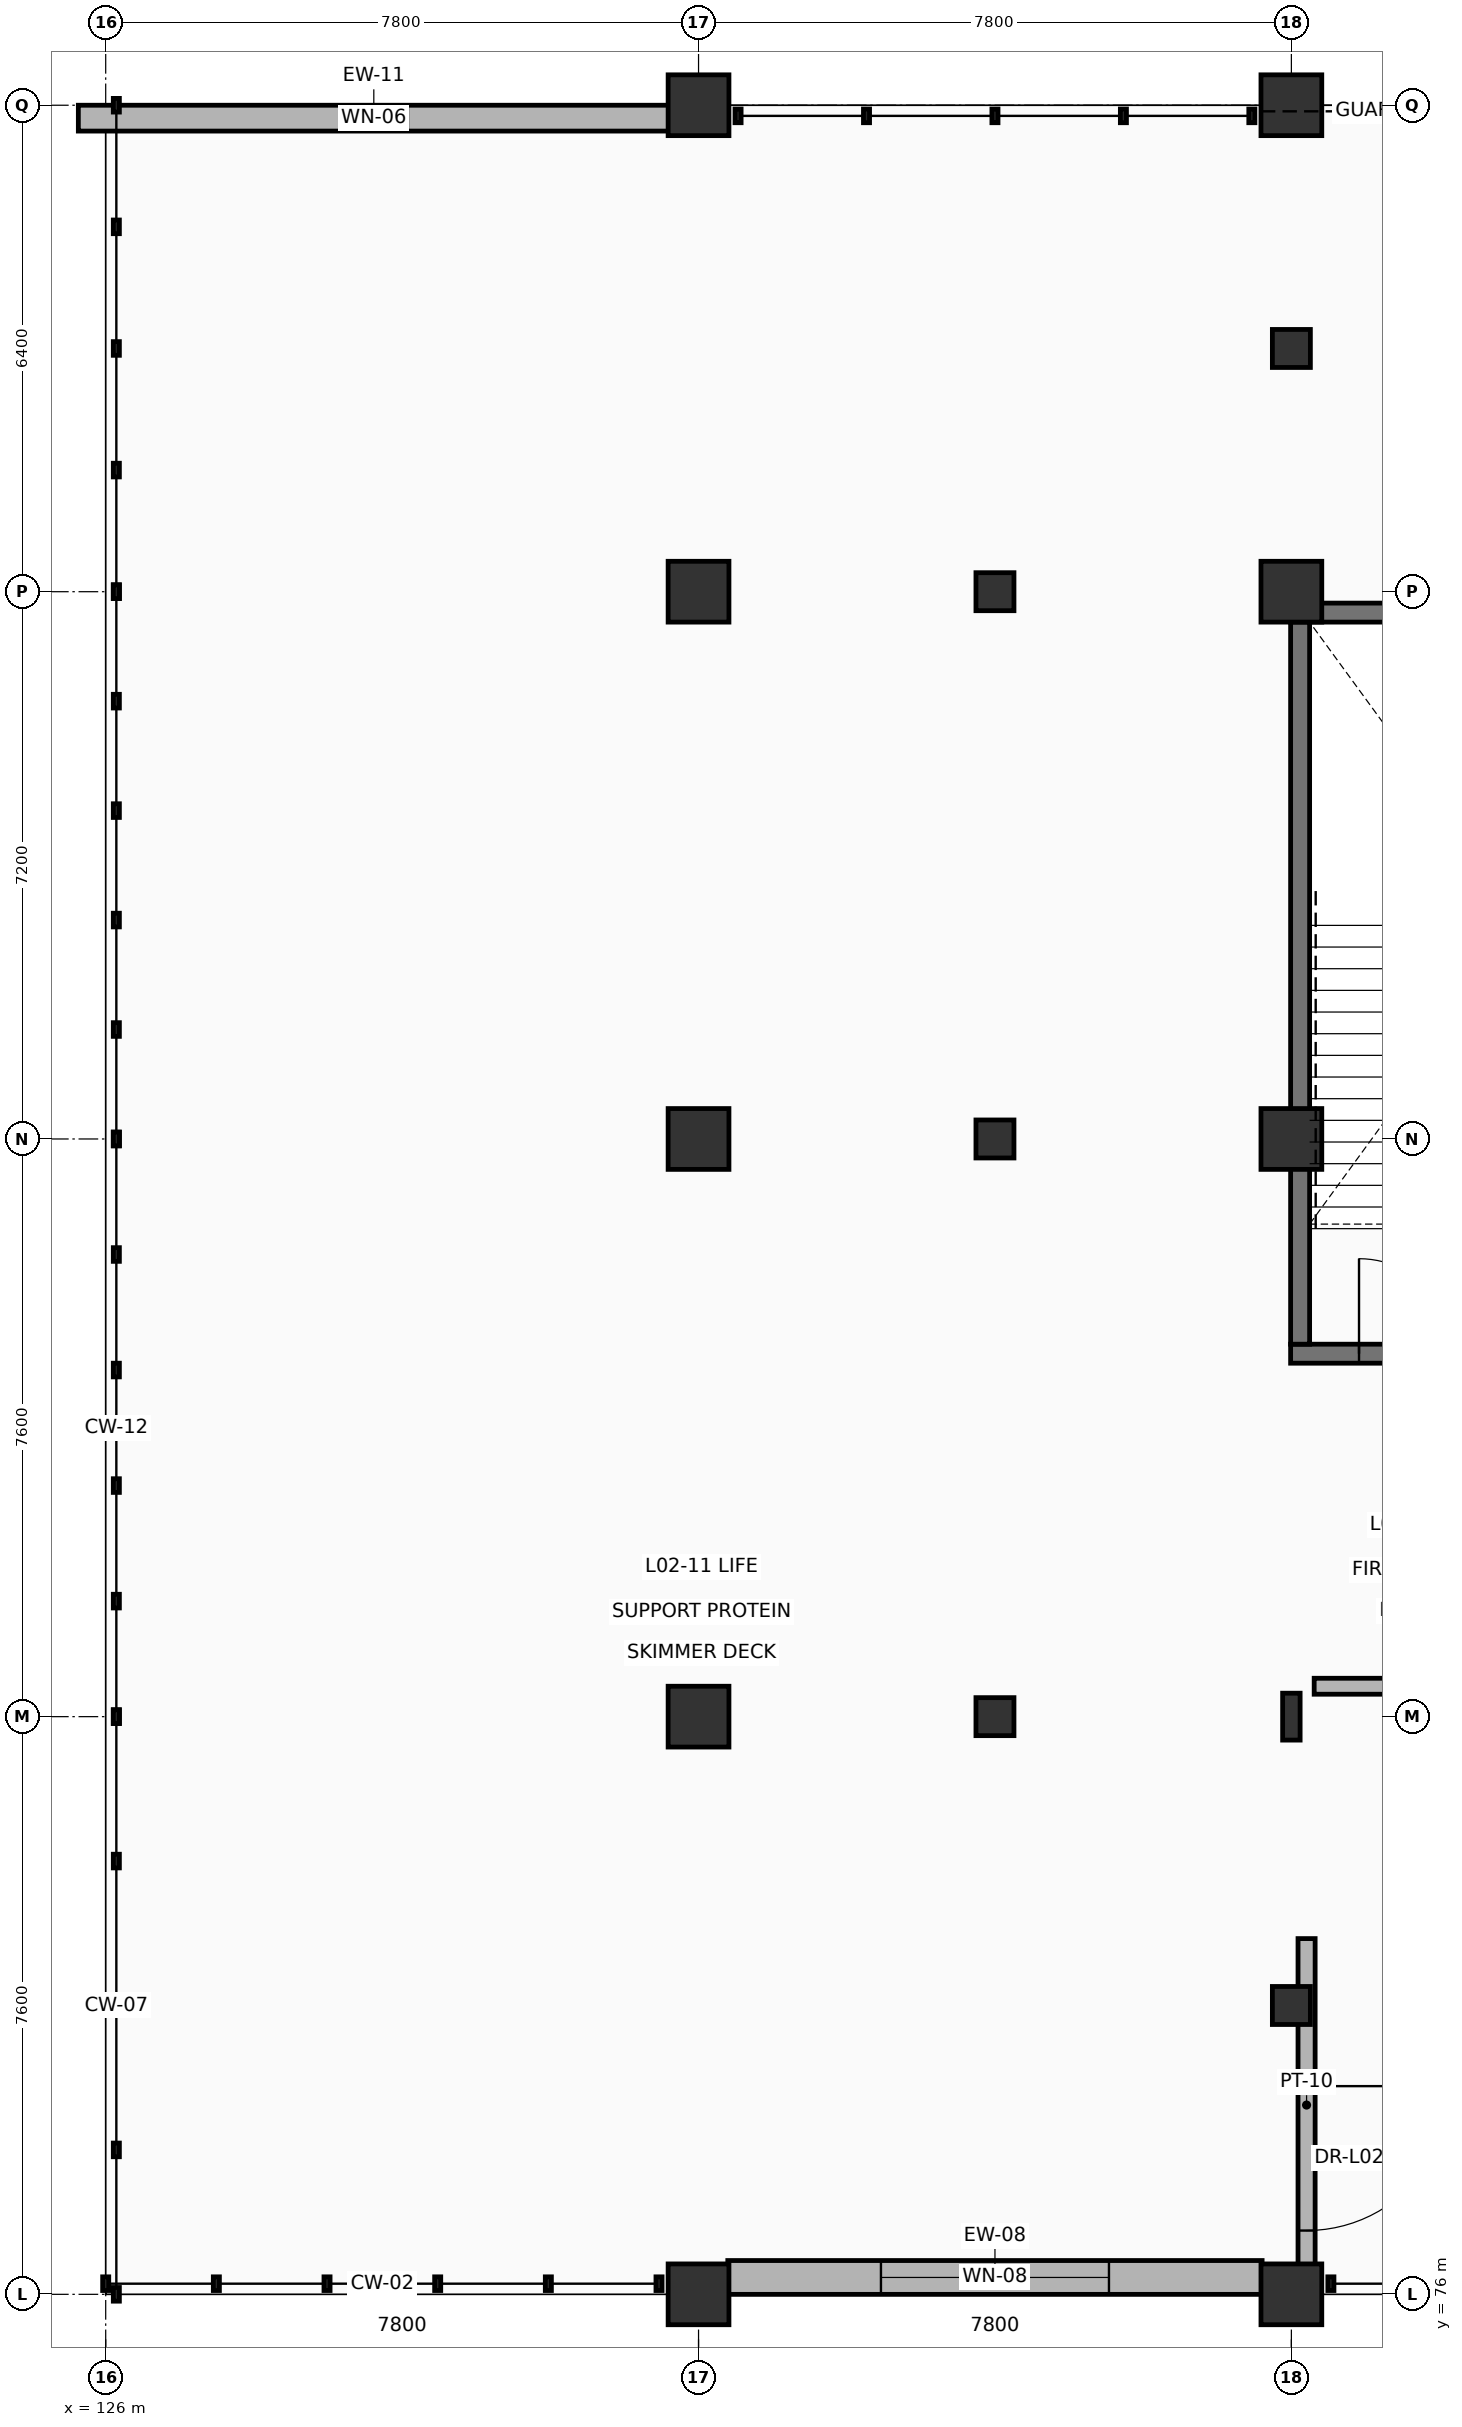
"""IFC4 building model, lengths in metres.
Left out: names, types, materials, properties, quantities, classifications, styles, units other than length and angle.
Written with IfcOpenShell. Run it as: python <this file> out.ifc"""

import sys

from ifc_helpers import new_model, si_unit, direction, frame, frame_2d, origin, origin_2d, place, context, subcontext, project, spatial, rectangle, i_section, extrude, element, fill, save


model = new_model("IFC4")
c1 = context("Model", 3, precision=1e-05, world=origin(), true_north=direction((0.0, 1.0)))
c2 = subcontext(c1, "Body", "Model", "MODEL_VIEW")
j1 = project(units=[si_unit("LENGTHUNIT", "METRE"), si_unit("PLANEANGLEUNIT", "RADIAN")], contexts=[c1])
p1 = place(None, origin())
s1 = spatial("IfcSite", under=j1, at=p1, CompositionType="ELEMENT")
p2 = place(p1, origin())
s2 = spatial("IfcBuilding", under=s1, at=p2, CompositionType="ELEMENT")
p3 = place(p2, frame((0.0, 0.0, 5.4)))
s3 = spatial("IfcBuildingStorey", under=s2, at=p3, CompositionType="ELEMENT", Elevation=5.4)
for number, where, z_axis, x_axis in (
    (1, (133.8, 76.0, 0.0), (0.0, 0.0, 1.0), (1.0, 0.0, 0.0)),
    (2, (133.8, 83.6, 0.0), (0.0, 0.0, 1.0), (1.0, 0.0, 0.0)),
    (3, (133.8, 91.2, 0.0), (0.0, 0.0, 1.0), (1.0, 0.0, 0.0)),
    (4, (133.8, 98.4, 0.0), (0.0, 0.0, 1.0), (1.0, 0.0, 0.0)),
):
    element("IfcColumn", number, at=place(p3, frame(where, z_axis=z_axis, x_axis=x_axis)), inside=s3, PredefinedType="COLUMN", context=c2, shape_type="SweptSolid", body=[
        extrude(rectangle(XDim=0.8, YDim=0.8, at=origin_2d()), origin(), (0.0, 0.0, 1.0), 5.1),
    ])
p4 = place(p3, frame((133.8, 104.8, 0.0), z_axis=(0.0, 0.0, 1.0), x_axis=(1.0, 0.0, 0.0)))
e5 = element("IfcColumn", 5, at=p4, inside=s3, PredefinedType="COLUMN", context=c2, shape_type="SweptSolid", body=[
    extrude(rectangle(XDim=0.8, YDim=0.8, at=origin_2d()), origin(), (0.0, 0.0, 1.0), 4.82),
])
p5 = place(p3, frame((141.6, 76.0, 0.0), z_axis=(0.0, 0.0, 1.0), x_axis=(1.0, 0.0, 0.0)))
e6 = element("IfcColumn", 6, at=p5, inside=s3, PredefinedType="COLUMN", context=c2, shape_type="SweptSolid", body=[
    extrude(rectangle(XDim=0.8, YDim=0.8, at=origin_2d()), origin(), (0.0, 0.0, 1.0), 5.1),
])
p6 = place(p3, frame((141.6, 83.6, 0.0), z_axis=(0.0, 0.0, 1.0), x_axis=(1.0, 0.0, 0.0)))
e7 = element("IfcColumn", 7, at=p6, inside=s3, PredefinedType="COLUMN", context=c2, shape_type="SweptSolid", body=[
    extrude(i_section(OverallWidth=0.23, OverallDepth=0.617, WebThickness=0.013, FlangeThickness=0.022, at=origin_2d()), origin(), (0.0, 0.0, 1.0), 5.1),
])
for number, where, z_axis, x_axis in (
    (8, (141.6, 91.2, 0.0), (0.0, 0.0, 1.0), (1.0, 0.0, 0.0)),
    (9, (141.6, 98.4, 0.0), (0.0, 0.0, 1.0), (1.0, 0.0, 0.0)),
):
    element("IfcColumn", number, at=place(p3, frame(where, z_axis=z_axis, x_axis=x_axis)), inside=s3, PredefinedType="COLUMN", context=c2, shape_type="SweptSolid", body=[
        extrude(rectangle(XDim=0.8, YDim=0.8, at=origin_2d()), origin(), (0.0, 0.0, 1.0), 5.1),
    ])
p7 = place(p3, frame((141.6, 104.8, 0.0), z_axis=(0.0, 0.0, 1.0), x_axis=(1.0, 0.0, 0.0)))
e10 = element("IfcColumn", 10, at=p7, inside=s3, PredefinedType="COLUMN", context=c2, shape_type="SweptSolid", body=[
    extrude(rectangle(XDim=0.8, YDim=0.8, at=origin_2d()), origin(), (0.0, 0.0, 1.0), 4.82),
])
for number, where, z_axis, x_axis in (
    (11, (137.7, 83.6, 0.0), (0.0, 0.0, 1.0), (1.0, 0.0, 0.0)),
    (12, (137.7, 91.2, 0.0), (0.0, 0.0, 1.0), (1.0, 0.0, 0.0)),
    (13, (137.7, 98.4, 0.0), (0.0, 0.0, 1.0), (1.0, 0.0, 0.0)),
    (14, (141.6, 79.8, 0.0), (0.0, 0.0, 1.0), (1.0, 0.0, 0.0)),
    (15, (141.6, 101.6, 0.0), (0.0, 0.0, 1.0), (1.0, 0.0, 0.0)),
):
    element("IfcColumn", number, at=place(p3, frame(where, z_axis=z_axis, x_axis=x_axis)), inside=s3, PredefinedType="COLUMN", context=c2, shape_type="SweptSolid", body=[
        extrude(rectangle(XDim=0.5, YDim=0.5, at=origin_2d()), origin(), (0.0, 0.0, 1.0), 4.82),
    ])
p8 = place(p3, frame((141.215, 76.222, 0.0), z_axis=(0.0, 0.0, 1.0), x_axis=(-1.0, 0.0, 0.0)))
e16 = element("IfcWall", 16, at=p8, inside=s3, PredefinedType="SOLIDWALL", context=c2, shape_type="SweptSolid", body=[
    extrude(rectangle(XDim=7.03, YDim=0.445, at=frame_2d((3.515, 0.0))), origin(), (0.0, 0.0, 1.0), 4.565),
])
p9 = place(p8, frame((2.015, 0.0, 0.95)))
e17 = element("IfcOpeningElement", 17, at=p9, cuts=e16, PredefinedType="OPENING", context=c2, shape_type="SweptSolid", body=[
    extrude(rectangle(XDim=3.0, YDim=2.2, at=frame_2d((1.5, 1.1))), frame((0.0, 0.232, 0.0), z_axis=(0.0, -1.0, 0.0), x_axis=(1.0, 0.0, 0.0)), (0.0, 0.0, 1.0), 0.465),
])
p10 = place(p3, frame((125.64, 104.63, 0.0), z_axis=(0.0, 0.0, 1.0), x_axis=(1.0, 0.0, 0.0)))
e18 = element("IfcWall", 18, at=p10, inside=s3, PredefinedType="SOLIDWALL", context=c2, shape_type="SweptSolid", body=[
    extrude(rectangle(XDim=7.775, YDim=0.34, at=frame_2d((3.888, 0.0))), origin(), (0.0, 0.0, 1.0), 4.86),
])
p11 = place(p10, frame((3.437, 0.0, 0.95)))
e19 = element("IfcOpeningElement", 19, at=p11, cuts=e18, PredefinedType="OPENING", context=c2, shape_type="SweptSolid", body=[
    extrude(rectangle(XDim=0.9, YDim=1.6, at=frame_2d((0.45, 0.8))), frame((0.0, 0.18, 0.0), z_axis=(0.0, -1.0, 0.0), x_axis=(1.0, 0.0, 0.0)), (0.0, 0.0, 1.0), 0.36),
])
p12 = place(p3, frame((141.59, 88.375, 0.0), z_axis=(0.0, 0.0, 1.0), x_axis=(1.0, 0.0, 0.0)))
e20 = element("IfcWall", 20, at=p12, inside=s3, PredefinedType="SHEAR", context=c2, shape_type="SweptSolid", body=[
    extrude(rectangle(XDim=6.28, YDim=0.25, at=frame_2d((3.14, 0.0))), origin(), (0.0, 0.0, 1.0), 4.82),
])
p13 = place(p12, frame((0.9, 0.0, 0.0)))
e21 = element("IfcOpeningElement", 21, at=p13, cuts=e20, PredefinedType="OPENING", context=c2, shape_type="SweptSolid", body=[
    extrude(rectangle(XDim=1.25, YDim=2.2, at=frame_2d((0.625, 1.1))), frame((0.0, 0.135, 0.0), z_axis=(0.0, -1.0, 0.0), x_axis=(1.0, 0.0, 0.0)), (0.0, 0.0, 1.0), 0.27),
])
p14 = place(p3, frame((141.59, 98.125, 0.0), z_axis=(0.0, 0.0, 1.0), x_axis=(1.0, 0.0, 0.0)))
e22 = element("IfcWall", 22, at=p14, inside=s3, PredefinedType="SHEAR", context=c2, shape_type="SweptSolid", body=[
    extrude(rectangle(XDim=6.28, YDim=0.25, at=frame_2d((3.14, 0.0))), origin(), (0.0, 0.0, 1.0), 4.82),
])
p15 = place(p3, frame((141.715, 88.5, 0.0), z_axis=(0.0, 0.0, 1.0), x_axis=(0.0, 1.0, 0.0)))
e23 = element("IfcWall", 23, at=p15, inside=s3, PredefinedType="SHEAR", context=c2, shape_type="SweptSolid", body=[
    extrude(rectangle(XDim=9.5, YDim=0.25, at=frame_2d((4.75, 0.0))), origin(), (0.0, 0.0, 1.0), 4.82),
])
p16 = place(p3, frame((141.9, 84.0, 0.0), z_axis=(0.0, 0.0, 1.0), x_axis=(1.0, 0.0, 0.0)))
e24 = element("IfcWall", 24, at=p16, inside=s3, PredefinedType="PARTITIONING", context=c2, shape_type="SweptSolid", body=[
    extrude(rectangle(XDim=7.25, YDim=0.21, at=frame_2d((3.625, 0.0))), origin(), (0.0, 0.0, 1.0), 4.82),
])
p17 = place(p16, frame((1.212, 0.0, 0.0)))
e25 = element("IfcOpeningElement", 25, at=p17, cuts=e24, PredefinedType="OPENING", context=c2, shape_type="SweptSolid", body=[
    extrude(rectangle(XDim=1.2, YDim=2.2, at=frame_2d((0.6, 1.1))), frame((0.0, 0.115, 0.0), z_axis=(0.0, -1.0, 0.0), x_axis=(1.0, 0.0, 0.0)), (0.0, 0.0, 1.0), 0.23),
])
p18 = place(p16, frame((4.838, 0.0, 0.0)))
e26 = element("IfcOpeningElement", 26, at=p18, cuts=e24, PredefinedType="OPENING", context=c2, shape_type="SweptSolid", body=[
    extrude(rectangle(XDim=1.2, YDim=2.2, at=frame_2d((0.6, 1.1))), frame((0.0, 0.115, 0.0), z_axis=(0.0, -1.0, 0.0), x_axis=(1.0, 0.0, 0.0)), (0.0, 0.0, 1.0), 0.23),
])
p19 = place(p3, frame((141.8, 80.68, 0.0), z_axis=(0.0, 0.0, 1.0), x_axis=(0.0, -1.0, 0.0)))
e27 = element("IfcWall", 27, at=p19, inside=s3, PredefinedType="PARTITIONING", context=c2, shape_type="SweptSolid", body=[
    extrude(rectangle(XDim=4.38, YDim=0.225, at=frame_2d((2.19, 0.0))), origin(), (0.0, 0.0, 1.0), 4.198),
])
p20 = place(p19, frame((1.941, 0.0, 0.0)))
e28 = element("IfcOpeningElement", 28, at=p20, cuts=e27, PredefinedType="OPENING", context=c2, shape_type="SweptSolid", body=[
    extrude(rectangle(XDim=1.9, YDim=2.4, at=frame_2d((0.95, 1.2))), frame((0.0, 0.123, 0.0), z_axis=(0.0, -1.0, 0.0), x_axis=(1.0, 0.0, 0.0)), (0.0, 0.0, 1.0), 0.245),
])
p21 = place(p9, origin())
e29 = element("IfcWindow", 29, at=p21, inside=s3, PartitioningType="SINGLE_PANEL", PredefinedType="WINDOW", context=c2, shape_type="SweptSolid", body=[
    extrude(rectangle(XDim=3.0, YDim=2.2, at=frame_2d((1.5, 1.1))), frame((0.0, 0.03, 0.0), z_axis=(0.0, -1.0, 0.0), x_axis=(1.0, 0.0, 0.0)), (0.0, 0.0, 1.0), 0.06),
])
fill(e17, e29)
p22 = place(p11, origin())
e30 = element("IfcWindow", 30, at=p22, inside=s3, PartitioningType="SINGLE_PANEL", PredefinedType="WINDOW", context=c2, shape_type="SweptSolid", body=[
    extrude(rectangle(XDim=0.9, YDim=1.6, at=frame_2d((0.45, 0.8))), frame((0.0, 0.03, 0.0), z_axis=(0.0, -1.0, 0.0), x_axis=(1.0, 0.0, 0.0)), (0.0, 0.0, 1.0), 0.06),
])
fill(e19, e30)
p23 = place(p13, origin())
e31 = element("IfcDoor", 31, at=p23, inside=s3, OperationType="SINGLE_SWING_LEFT", PredefinedType="DOOR", context=c2, shape_type="SweptSolid", body=[
    extrude(rectangle(XDim=1.25, YDim=2.2, at=frame_2d((0.625, 1.1))), frame((0.0, 0.025, 0.0), z_axis=(0.0, -1.0, 0.0), x_axis=(1.0, 0.0, 0.0)), (0.0, 0.0, 1.0), 0.05),
])
fill(e21, e31)
p24 = place(p20, origin())
e32 = element("IfcDoor", 32, at=p24, inside=s3, OperationType="DOUBLE_DOOR_SINGLE_SWING", PredefinedType="DOOR", context=c2, shape_type="SweptSolid", body=[
    extrude(rectangle(XDim=1.9, YDim=2.4, at=frame_2d((0.95, 1.2))), frame((0.0, 0.025, 0.0), z_axis=(0.0, -1.0, 0.0), x_axis=(1.0, 0.0, 0.0)), (0.0, 0.0, 1.0), 0.05),
])
fill(e28, e32)
save(model, sys.argv[1])
